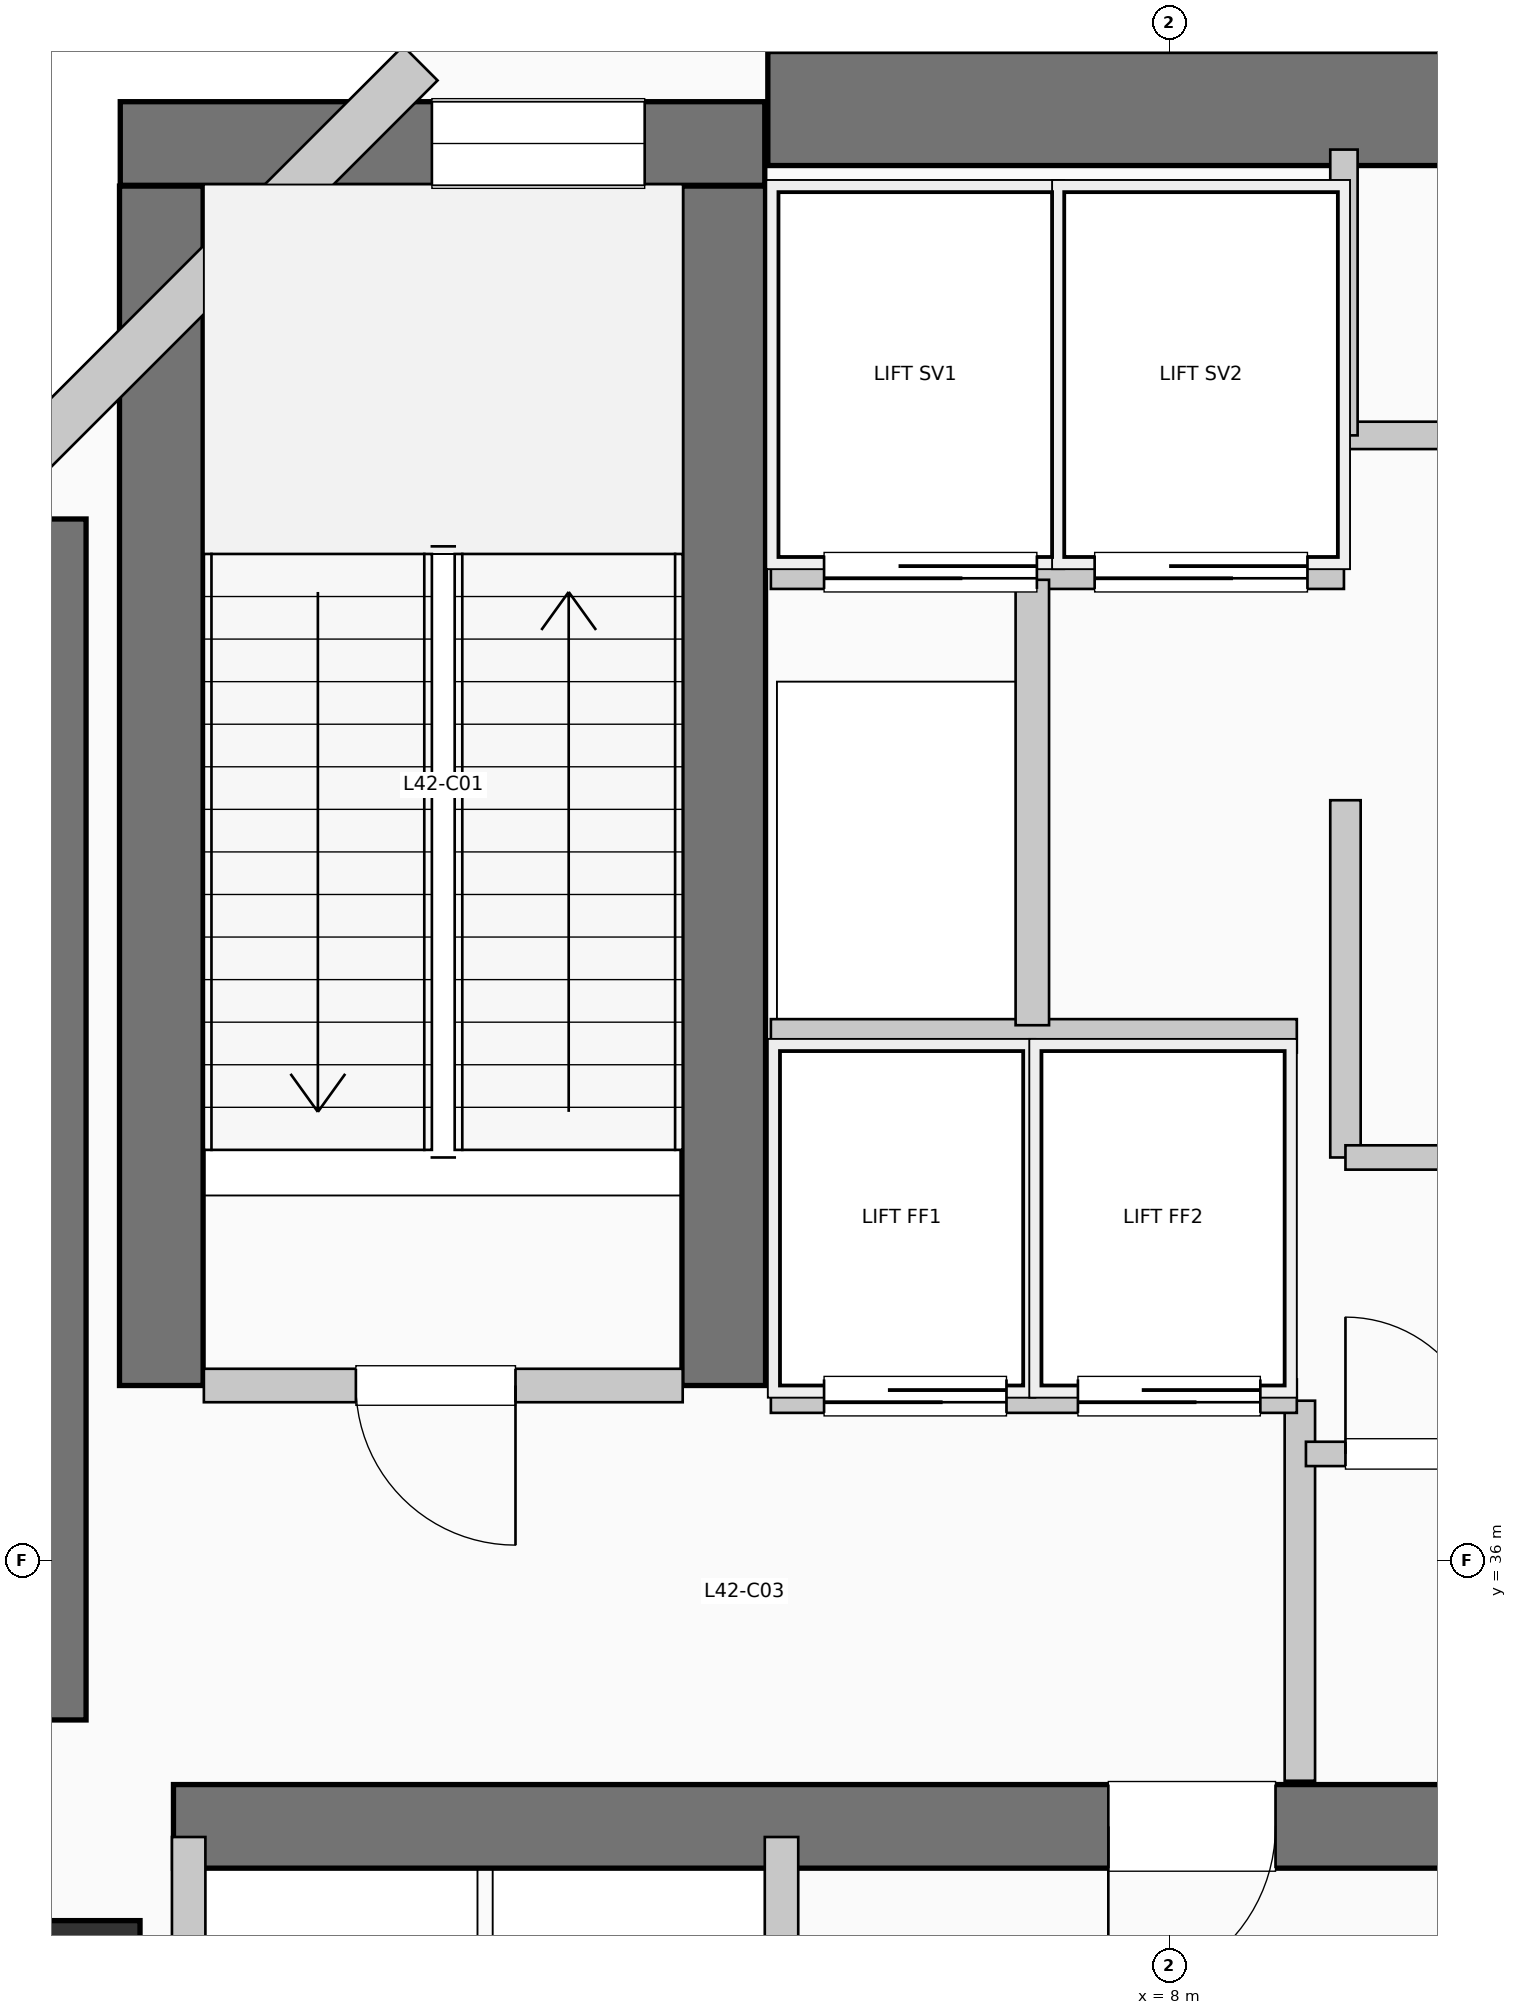
"""IFC4 building model, lengths in metres.
Left out: names, types, materials, properties, quantities, classifications, styles, units other than length and angle.
Written with IfcOpenShell. Run it as: python <this file> out.ifc"""

import sys

from ifc_helpers import new_model, si_unit, direction, frame, frame_2d, origin, origin_2d, place, context, subcontext, project, spatial, rectangle, extrude, element, fill, save


model = new_model("IFC4")
c1 = context("Model", 3, precision=1e-05, world=origin(), true_north=direction((0.0, 1.0)))
c2 = subcontext(c1, "Body", "Model", "MODEL_VIEW")
j1 = project(units=[si_unit("LENGTHUNIT", "METRE"), si_unit("PLANEANGLEUNIT", "RADIAN")], contexts=[c1])
p1 = place(None, origin())
s1 = spatial("IfcSite", under=j1, at=p1, CompositionType="ELEMENT")
p2 = place(p1, origin())
s2 = spatial("IfcBuilding", under=s1, at=p2, CompositionType="ELEMENT")
p3 = place(p2, frame((0.0, 0.0, 174.57)))
s3 = spatial("IfcBuildingStorey", under=s2, at=p3, CompositionType="ELEMENT", Elevation=174.57)
p4 = place(p3, frame((5.36, 45.55, 0.0), z_axis=(0.0, 0.0, 1.0), x_axis=(1.0, 0.0, 0.0)))
e1 = element("IfcWall", 1, at=p4, inside=s3, PredefinedType="SHEAR", context=c2, shape_type="SweptSolid", body=[
    extrude(rectangle(XDim=13.98, YDim=0.75, at=frame_2d((6.99, 0.0))), origin(), (0.0, 0.0, 1.0), 4.95),
])
p5 = place(p3, frame((0.5, 34.95, 0.0), z_axis=(0.0, 0.0, 1.0), x_axis=(0.0, 1.0, 0.0)))
e2 = element("IfcWall", 2, at=p5, inside=s3, PredefinedType="SHEAR", context=c2, shape_type="SweptSolid", body=[
    extrude(rectangle(XDim=7.9, YDim=0.75, at=frame_2d((3.95, 0.0))), origin(), (0.0, 0.0, 1.0), 4.95),
])
p6 = place(p3, frame((1.45, 34.25, 0.0), z_axis=(0.0, 0.0, 1.0), x_axis=(1.0, 0.0, 0.0)))
e3 = element("IfcWall", 3, at=p6, inside=s3, PredefinedType="SHEAR", context=c2, shape_type="SweptSolid", body=[
    extrude(rectangle(XDim=10.71, YDim=0.55, at=frame_2d((5.355, 0.0))), origin(), (0.0, 0.0, 1.0), 4.95),
])
p7 = place(p6, frame((7.25, 0.0, 0.0), z_axis=(0.0, 0.0, 1.0), x_axis=(-1.0, 0.0, 0.0)))
e4 = element("IfcOpeningElement", 4, at=p7, cuts=e3, PredefinedType="OPENING", context=c2, shape_type="SweptSolid", body=[
    extrude(rectangle(XDim=1.1, YDim=2.15, at=frame_2d((0.55, 1.075))), frame((0.0, 0.285, 0.0), z_axis=(0.0, -1.0, 0.0), x_axis=(1.0, 0.0, 0.0)), (0.0, 0.0, 1.0), 0.57),
])
for number, where, z_axis, x_axis in (
    (5, (1.37, 37.15, 0.0), (0.0, 0.0, 1.0), (0.0, 1.0, 0.0)),
    (6, (5.07, 37.15, 0.0), (0.0, 0.0, 1.0), (0.0, 1.0, 0.0)),
):
    element("IfcWall", number, at=place(p3, frame(where, z_axis=z_axis, x_axis=x_axis)), inside=s3, PredefinedType="SHEAR", context=c2, shape_type="SweptSolid", body=[
        extrude(rectangle(XDim=7.89, YDim=0.55, at=frame_2d((3.945, 0.0))), origin(), (0.0, 0.0, 1.0), 4.95),
    ])
p8 = place(p3, frame((1.1, 45.32, 0.0), z_axis=(0.0, 0.0, 1.0), x_axis=(1.0, 0.0, 0.0)))
e7 = element("IfcWall", 7, at=p8, inside=s3, PredefinedType="SHEAR", context=c2, shape_type="SweptSolid", body=[
    extrude(rectangle(XDim=4.24, YDim=0.55, at=frame_2d((2.12, 0.0))), origin(), (0.0, 0.0, 1.0), 4.95),
])
p9 = place(p8, frame((2.05, 0.0, 1.05)))
e8 = element("IfcOpeningElement", 8, at=p9, cuts=e7, PredefinedType="OPENING", context=c2, shape_type="SweptSolid", body=[
    extrude(rectangle(XDim=1.4, YDim=1.8, at=frame_2d((0.7, 0.9))), frame((0.0, 0.285, 0.0), z_axis=(0.0, -1.0, 0.0), x_axis=(1.0, 0.0, 0.0)), (0.0, 0.0, 1.0), 0.57),
])
p10 = place(p3, frame((0.8, 33.2, 0.0), z_axis=(0.0, 0.0, 1.0), x_axis=(1.0, 0.0, 0.0)))
e9 = element("IfcColumn", 9, at=p10, inside=s3, PredefinedType="COLUMN", context=c2, shape_type="SweptSolid", body=[
    extrude(rectangle(XDim=0.86, YDim=0.86, at=origin_2d()), origin(), (0.0, 0.0, 1.0), 4.95),
])
p11 = place(p3, frame((3.074, 45.848, 0.0), z_axis=(0.0, 0.0, 1.0), x_axis=(-0.707106781187, -0.707106781187, 0.0)))
e10 = element("IfcWall", 10, at=p11, inside=s3, PredefinedType="SOLIDWALL", context=c2, shape_type="SweptSolid", body=[
    extrude(rectangle(XDim=4.133, YDim=0.32, at=frame_2d((2.066, 0.0))), origin(), (0.0, 0.0, 1.0), 4.7),
])
p12 = place(p3, frame((1.65, 37.15, 0.0), z_axis=(0.0, 0.0, 1.0), x_axis=(1.0, 0.0, 0.0)))
e11 = element("IfcWall", 11, at=p12, inside=s3, PredefinedType="PARTITIONING", context=c2, shape_type="SweptSolid", body=[
    extrude(rectangle(XDim=3.15, YDim=0.22, at=frame_2d((1.575, 0.0))), origin(), (0.0, 0.0, 1.0), 4.7),
])
p13 = place(p12, frame((2.05, 0.0, 0.0), z_axis=(0.0, 0.0, 1.0), x_axis=(-1.0, 0.0, 0.0)))
e12 = element("IfcOpeningElement", 12, at=p13, cuts=e11, PredefinedType="OPENING", context=c2, shape_type="SweptSolid", body=[
    extrude(rectangle(XDim=1.05, YDim=2.15, at=frame_2d((0.525, 1.075))), frame((0.0, 0.12, 0.0), z_axis=(0.0, -1.0, 0.0), x_axis=(1.0, 0.0, 0.0)), (0.0, 0.0, 1.0), 0.24),
])
p14 = place(p3, frame((8.86, 34.55, 0.0), z_axis=(0.0, 0.0, 1.0), x_axis=(0.0, 1.0, 0.0)))
e13 = element("IfcWall", 13, at=p14, inside=s3, PredefinedType="PARTITIONING", context=c2, shape_type="SweptSolid", body=[
    extrude(rectangle(XDim=2.5, YDim=0.2, at=frame_2d((1.25, 0.0))), origin(), (0.0, 0.0, 1.0), 4.7),
])
p15 = place(p3, frame((5.38, 37.08, 0.0), z_axis=(0.0, 0.0, 1.0), x_axis=(1.0, 0.0, 0.0)))
e14 = element("IfcWall", 14, at=p15, inside=s3, PredefinedType="PARTITIONING", context=c2, shape_type="SweptSolid", body=[
    extrude(rectangle(XDim=3.46, YDim=0.22, at=frame_2d((1.73, 0.0))), origin(), (0.0, 0.0, 1.0), 4.7),
])
p16 = place(p15, frame((1.55, 0.0, 0.0), z_axis=(0.0, 0.0, 1.0), x_axis=(-1.0, 0.0, 0.0)))
e15 = element("IfcOpeningElement", 15, at=p16, cuts=e14, PredefinedType="OPENING", context=c2, shape_type="SweptSolid", body=[
    extrude(rectangle(XDim=1.2, YDim=2.2, at=frame_2d((0.6, 1.1))), frame((0.0, 0.12, 0.0), z_axis=(0.0, -1.0, 0.0), x_axis=(1.0, 0.0, 0.0)), (0.0, 0.0, 1.0), 0.24),
])
p17 = place(p15, frame((3.22, 0.0, 0.0), z_axis=(0.0, 0.0, 1.0), x_axis=(-1.0, 0.0, 0.0)))
e16 = element("IfcOpeningElement", 16, at=p17, cuts=e14, PredefinedType="OPENING", context=c2, shape_type="SweptSolid", body=[
    extrude(rectangle(XDim=1.2, YDim=2.2, at=frame_2d((0.6, 1.1))), frame((0.0, 0.12, 0.0), z_axis=(0.0, -1.0, 0.0), x_axis=(1.0, 0.0, 0.0)), (0.0, 0.0, 1.0), 0.24),
])
p18 = place(p3, frame((5.38, 39.45, 0.0), z_axis=(0.0, 0.0, 1.0), x_axis=(1.0, 0.0, 0.0)))
e17 = element("IfcWall", 17, at=p18, inside=s3, PredefinedType="PARTITIONING", context=c2, shape_type="SweptSolid", body=[
    extrude(rectangle(XDim=3.46, YDim=0.22, at=frame_2d((1.73, 0.0))), origin(), (0.0, 0.0, 1.0), 4.7),
])
p19 = place(p3, frame((5.38, 42.5, 0.0), z_axis=(0.0, 0.0, 1.0), x_axis=(1.0, 0.0, 0.0)))
e18 = element("IfcWall", 18, at=p19, inside=s3, PredefinedType="PARTITIONING", context=c2, shape_type="SweptSolid", body=[
    extrude(rectangle(XDim=3.77, YDim=0.22, at=frame_2d((1.885, 0.0))), origin(), (0.0, 0.0, 1.0), 4.7),
])
p20 = place(p19, frame((1.75, 0.0, 0.0), z_axis=(0.0, 0.0, 1.0), x_axis=(-1.0, 0.0, 0.0)))
e19 = element("IfcOpeningElement", 19, at=p20, cuts=e18, PredefinedType="OPENING", context=c2, shape_type="SweptSolid", body=[
    extrude(rectangle(XDim=1.4, YDim=2.2, at=frame_2d((0.7, 1.1))), frame((0.0, 0.12, 0.0), z_axis=(0.0, -1.0, 0.0), x_axis=(1.0, 0.0, 0.0)), (0.0, 0.0, 1.0), 0.24),
])
p21 = place(p19, frame((3.53, 0.0, 0.0), z_axis=(0.0, 0.0, 1.0), x_axis=(-1.0, 0.0, 0.0)))
e20 = element("IfcOpeningElement", 20, at=p21, cuts=e18, PredefinedType="OPENING", context=c2, shape_type="SweptSolid", body=[
    extrude(rectangle(XDim=1.4, YDim=2.2, at=frame_2d((0.7, 1.1))), frame((0.0, 0.12, 0.0), z_axis=(0.0, -1.0, 0.0), x_axis=(1.0, 0.0, 0.0)), (0.0, 0.0, 1.0), 0.24),
])
p22 = place(p3, frame((7.1, 39.52, 0.0), z_axis=(0.0, 0.0, 1.0), x_axis=(0.0, 1.0, 0.0)))
e21 = element("IfcWall", 21, at=p22, inside=s3, PredefinedType="PARTITIONING", context=c2, shape_type="SweptSolid", body=[
    extrude(rectangle(XDim=2.93, YDim=0.22, at=frame_2d((1.465, 0.0))), origin(), (0.0, 0.0, 1.0), 4.7),
])
for number, where, z_axis, x_axis in (
    (22, (1.55, 31.8, 0.0), (0.0, 0.0, 1.0), (0.0, 1.0, 0.0)),
    (23, (5.45, 31.8, 0.0), (0.0, 0.0, 1.0), (0.0, 1.0, 0.0)),
):
    element("IfcWall", number, at=place(p3, frame(where, z_axis=z_axis, x_axis=x_axis)), inside=s3, PredefinedType="PARTITIONING", context=c2, shape_type="SweptSolid", body=[
        extrude(rectangle(XDim=2.38, YDim=0.22, at=frame_2d((1.19, 0.0))), origin(), (0.0, 0.0, 1.0), 4.7),
    ])
p23 = place(p3, frame((9.16, 38.65, 0.0), z_axis=(0.0, 0.0, 1.0), x_axis=(0.0, 1.0, 0.0)))
e24 = element("IfcWall", 24, at=p23, inside=s3, PredefinedType="PARTITIONING", context=c2, shape_type="SweptSolid", body=[
    extrude(rectangle(XDim=2.35, YDim=0.2, at=frame_2d((1.175, 0.0))), origin(), (0.0, 0.0, 1.0), 4.7),
])
p24 = place(p3, frame((8.9, 36.7, 0.0), z_axis=(0.0, 0.0, 1.0), x_axis=(1.0, 0.0, 0.0)))
e25 = element("IfcWall", 25, at=p24, inside=s3, PredefinedType="PARTITIONING", context=c2, shape_type="SweptSolid", body=[
    extrude(rectangle(XDim=3.25, YDim=0.16, at=frame_2d((1.625, 0.0))), origin(), (0.0, 0.0, 1.0), 4.7),
])
p25 = place(p24, frame((0.26, 0.0, 0.0)))
e26 = element("IfcOpeningElement", 26, at=p25, cuts=e25, PredefinedType="OPENING", context=c2, shape_type="SweptSolid", body=[
    extrude(rectangle(XDim=0.9, YDim=2.15, at=frame_2d((0.45, 1.075))), frame((0.0, 0.09, 0.0), z_axis=(0.0, -1.0, 0.0), x_axis=(1.0, 0.0, 0.0)), (0.0, 0.0, 1.0), 0.18),
])
p26 = place(p24, frame((1.68, 0.0, 0.0)))
e27 = element("IfcOpeningElement", 27, at=p26, cuts=e25, PredefinedType="OPENING", context=c2, shape_type="SweptSolid", body=[
    extrude(rectangle(XDim=0.9, YDim=2.15, at=frame_2d((0.45, 1.075))), frame((0.0, 0.09, 0.0), z_axis=(0.0, -1.0, 0.0), x_axis=(1.0, 0.0, 0.0)), (0.0, 0.0, 1.0), 0.18),
])
p27 = place(p3, frame((9.16, 38.65, 0.0), z_axis=(0.0, 0.0, 1.0), x_axis=(1.0, 0.0, 0.0)))
e28 = element("IfcWall", 28, at=p27, inside=s3, PredefinedType="PARTITIONING", context=c2, shape_type="SweptSolid", body=[
    extrude(rectangle(XDim=3.42, YDim=0.16, at=frame_2d((1.71, 0.0))), origin(), (0.0, 0.0, 1.0), 4.7),
])
p28 = place(p27, frame((2.15, 0.0, 0.0), z_axis=(0.0, 0.0, 1.0), x_axis=(-1.0, 0.0, 0.0)))
e29 = element("IfcOpeningElement", 29, at=p28, cuts=e28, PredefinedType="OPENING", context=c2, shape_type="SweptSolid", body=[
    extrude(rectangle(XDim=0.95, YDim=2.15, at=frame_2d((0.475, 1.075))), frame((0.0, 0.09, 0.0), z_axis=(0.0, -1.0, 0.0), x_axis=(1.0, 0.0, 0.0)), (0.0, 0.0, 1.0), 0.18),
])
p29 = place(p3, frame((9.15, 43.4, 0.0), z_axis=(0.0, 0.0, 1.0), x_axis=(1.0, 0.0, 0.0)))
e30 = element("IfcWall", 30, at=p29, inside=s3, PredefinedType="PLUMBINGWALL", context=c2, shape_type="SweptSolid", body=[
    extrude(rectangle(XDim=9.33, YDim=0.18, at=frame_2d((4.665, 0.0))), origin(), (0.0, 0.0, 1.0), 4.7),
])
p30 = place(p29, frame((1.88, 0.0, 0.0)))
e31 = element("IfcOpeningElement", 31, at=p30, cuts=e30, PredefinedType="OPENING", context=c2, shape_type="SweptSolid", body=[
    extrude(rectangle(XDim=0.92, YDim=2.1, at=frame_2d((0.46, 1.05))), frame((0.0, 0.1, 0.0), z_axis=(0.0, -1.0, 0.0), x_axis=(1.0, 0.0, 0.0)), (0.0, 0.0, 1.0), 0.2),
])
p31 = place(p29, frame((6.515, 0.0, 0.0)))
e32 = element("IfcOpeningElement", 32, at=p31, cuts=e30, PredefinedType="OPENING", context=c2, shape_type="SweptSolid", body=[
    extrude(rectangle(XDim=0.92, YDim=2.1, at=frame_2d((0.46, 1.05))), frame((0.0, 0.1, 0.0), z_axis=(0.0, -1.0, 0.0), x_axis=(1.0, 0.0, 0.0)), (0.0, 0.0, 1.0), 0.2),
])
p32 = place(p3, frame((9.15, 43.4, 0.0), z_axis=(0.0, 0.0, 1.0), x_axis=(0.0, 1.0, 0.0)))
e33 = element("IfcWall", 33, at=p32, inside=s3, PredefinedType="PLUMBINGWALL", context=c2, shape_type="SweptSolid", body=[
    extrude(rectangle(XDim=1.88, YDim=0.18, at=frame_2d((0.94, 0.0))), origin(), (0.0, 0.0, 1.0), 4.7),
])
p33 = place(p9, origin())
e34 = element("IfcWindow", 34, at=p33, inside=s3, PartitioningType="SINGLE_PANEL", PredefinedType="WINDOW", context=c2, shape_type="SweptSolid", body=[
    extrude(rectangle(XDim=1.4, YDim=1.8, at=frame_2d((0.7, 0.9))), frame((0.0, 0.03, 0.0), z_axis=(0.0, -1.0, 0.0), x_axis=(1.0, 0.0, 0.0)), (0.0, 0.0, 1.0), 0.06),
])
fill(e8, e34)
p34 = place(p13, origin())
e35 = element("IfcDoor", 35, at=p34, inside=s3, OperationType="SINGLE_SWING_RIGHT", PredefinedType="DOOR", context=c2, shape_type="SweptSolid", body=[
    extrude(rectangle(XDim=1.05, YDim=2.15, at=frame_2d((0.525, 1.075))), frame((0.0, 0.025, 0.0), z_axis=(0.0, -1.0, 0.0), x_axis=(1.0, 0.0, 0.0)), (0.0, 0.0, 1.0), 0.05),
])
fill(e12, e35)
p35 = place(p7, origin())
e36 = element("IfcDoor", 36, at=p35, inside=s3, OperationType="SINGLE_SWING_LEFT", PredefinedType="DOOR", context=c2, shape_type="SweptSolid", body=[
    extrude(rectangle(XDim=1.1, YDim=2.15, at=frame_2d((0.55, 1.075))), frame((0.0, 0.025, 0.0), z_axis=(0.0, -1.0, 0.0), x_axis=(1.0, 0.0, 0.0)), (0.0, 0.0, 1.0), 0.05),
])
fill(e4, e36)
p36 = place(p16, origin())
e37 = element("IfcDoor", 37, at=p36, inside=s3, OperationType="SLIDING_TO_RIGHT", PredefinedType="DOOR", context=c2, shape_type="SweptSolid", body=[
    extrude(rectangle(XDim=1.2, YDim=2.2, at=frame_2d((0.6, 1.1))), frame((0.0, 0.025, 0.0), z_axis=(0.0, -1.0, 0.0), x_axis=(1.0, 0.0, 0.0)), (0.0, 0.0, 1.0), 0.05),
])
fill(e15, e37)
p37 = place(p17, origin())
e38 = element("IfcDoor", 38, at=p37, inside=s3, OperationType="SLIDING_TO_RIGHT", PredefinedType="DOOR", context=c2, shape_type="SweptSolid", body=[
    extrude(rectangle(XDim=1.2, YDim=2.2, at=frame_2d((0.6, 1.1))), frame((0.0, 0.025, 0.0), z_axis=(0.0, -1.0, 0.0), x_axis=(1.0, 0.0, 0.0)), (0.0, 0.0, 1.0), 0.05),
])
fill(e16, e38)
p38 = place(p20, origin())
e39 = element("IfcDoor", 39, at=p38, inside=s3, OperationType="SLIDING_TO_LEFT", PredefinedType="DOOR", context=c2, shape_type="SweptSolid", body=[
    extrude(rectangle(XDim=1.4, YDim=2.2, at=frame_2d((0.7, 1.1))), frame((0.0, 0.025, 0.0), z_axis=(0.0, -1.0, 0.0), x_axis=(1.0, 0.0, 0.0)), (0.0, 0.0, 1.0), 0.05),
])
fill(e19, e39)
p39 = place(p21, origin())
e40 = element("IfcDoor", 40, at=p39, inside=s3, OperationType="SLIDING_TO_LEFT", PredefinedType="DOOR", context=c2, shape_type="SweptSolid", body=[
    extrude(rectangle(XDim=1.4, YDim=2.2, at=frame_2d((0.7, 1.1))), frame((0.0, 0.025, 0.0), z_axis=(0.0, -1.0, 0.0), x_axis=(1.0, 0.0, 0.0)), (0.0, 0.0, 1.0), 0.05),
])
fill(e20, e40)
p40 = place(p25, origin())
e41 = element("IfcDoor", 41, at=p40, inside=s3, OperationType="SINGLE_SWING_LEFT", PredefinedType="DOOR", context=c2, shape_type="SweptSolid", body=[
    extrude(rectangle(XDim=0.9, YDim=2.15, at=frame_2d((0.45, 1.075))), frame((0.0, 0.025, 0.0), z_axis=(0.0, -1.0, 0.0), x_axis=(1.0, 0.0, 0.0)), (0.0, 0.0, 1.0), 0.05),
])
fill(e26, e41)
save(model, sys.argv[1])
